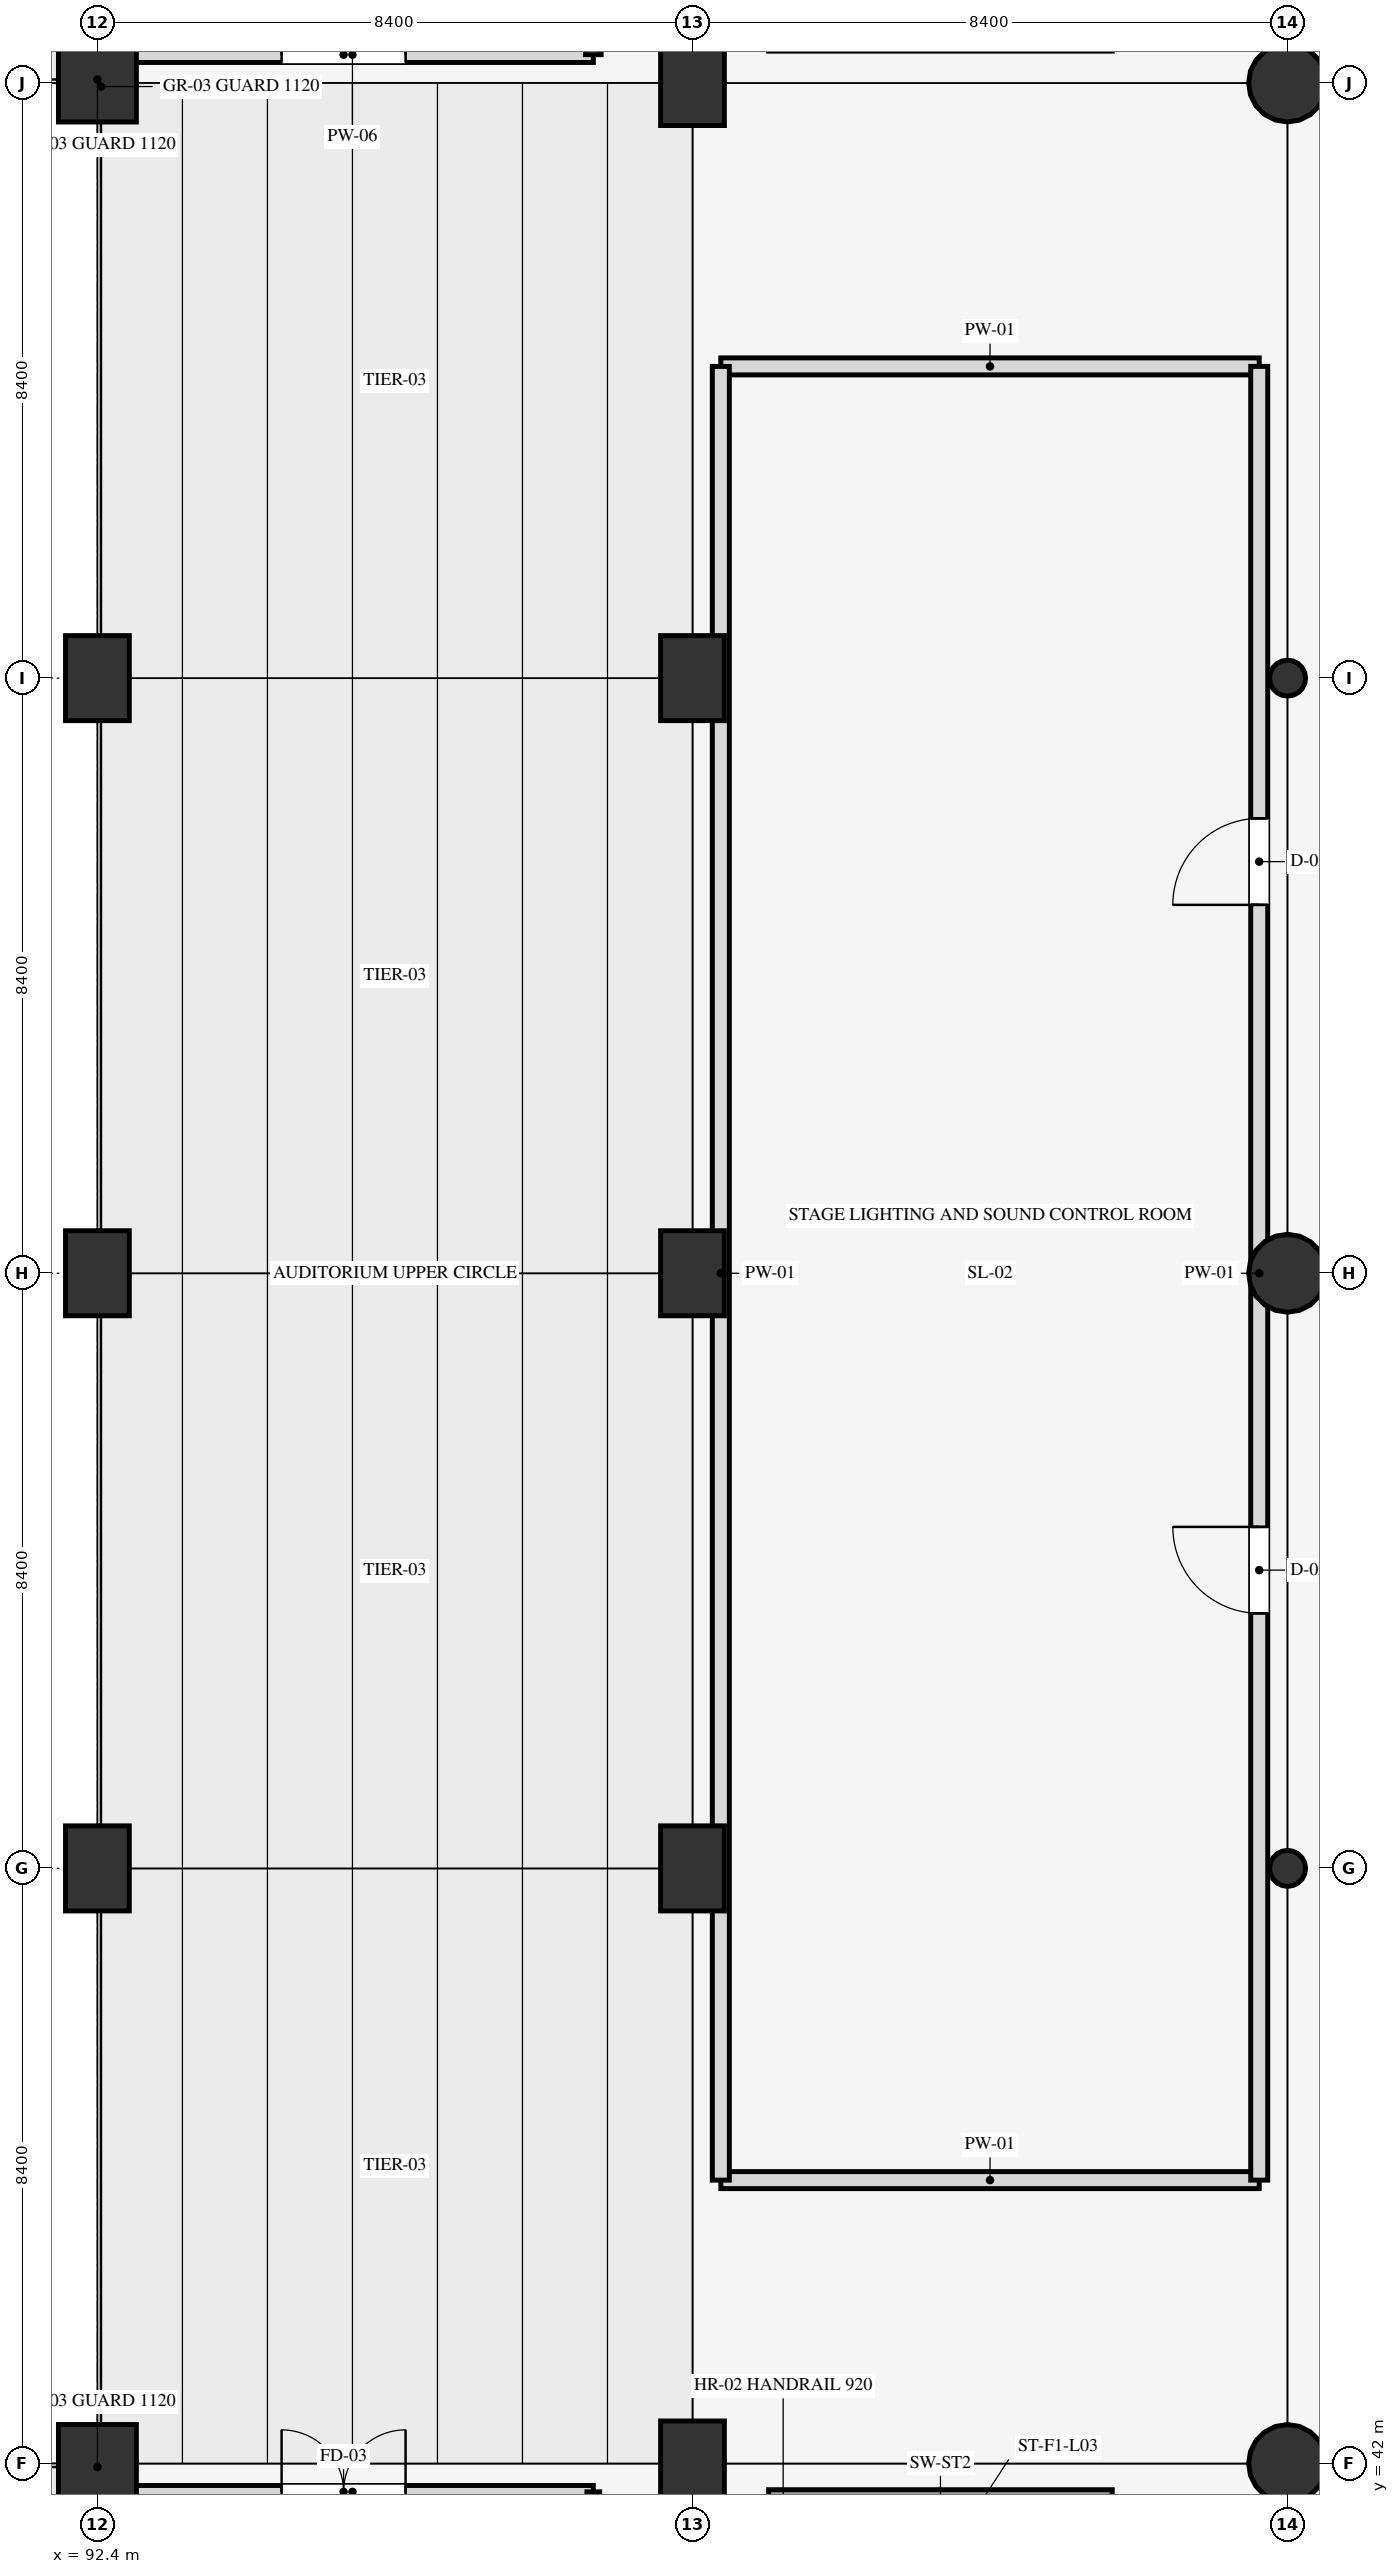
"""IFC4 building model, lengths in metres.
Left out: names, types, materials, properties, quantities, classifications, styles, units other than length and angle.
Written with IfcOpenShell. Run it as: python <this file> out.ifc"""

import sys

from ifc_helpers import new_model, si_unit, direction, frame, frame_2d, origin, origin_2d, place, context, subcontext, project, spatial, rectangle, circle, hollow_circle, extrude, element, fill, save


model = new_model("IFC4")
c1 = context("Model", 3, precision=1e-05, world=origin(), true_north=direction((0.0, 1.0)))
c2 = subcontext(c1, "Body", "Model", "MODEL_VIEW")
j1 = project(units=[si_unit("LENGTHUNIT", "METRE"), si_unit("PLANEANGLEUNIT", "RADIAN")], contexts=[c1])
p1 = place(None, origin())
s1 = spatial("IfcSite", under=j1, at=p1, CompositionType="ELEMENT")
p2 = place(p1, origin())
s2 = spatial("IfcBuilding", under=s1, at=p2, CompositionType="ELEMENT")
p3 = place(p2, frame((0.0, 0.0, 14.4)))
s3 = spatial("IfcBuildingStorey", under=s2, at=p3, CompositionType="ELEMENT", Elevation=14.4)
p4 = place(p3, frame((92.4, 42.0, 0.0), z_axis=(0.0, 0.0, 1.0), x_axis=(1.0, 0.0, 0.0)))
e1 = element("IfcColumn", 1, at=p4, inside=s3, PredefinedType="COLUMN", context=c2, shape_type="SweptSolid", body=[
    extrude(rectangle(XDim=1.1, YDim=1.1, at=origin_2d()), origin(), (0.0, 0.0, 1.0), 4.5),
])
for number, where, z_axis, x_axis in (
    (2, (92.4, 50.4, 0.0), (0.0, 0.0, 1.0), (1.0, 0.0, 0.0)),
    (3, (92.4, 58.8, 0.0), (0.0, 0.0, 1.0), (1.0, 0.0, 0.0)),
    (4, (92.4, 67.2, 0.0), (0.0, 0.0, 1.0), (1.0, 0.0, 0.0)),
):
    element("IfcColumn", number, at=place(p3, frame(where, z_axis=z_axis, x_axis=x_axis)), inside=s3, PredefinedType="COLUMN", context=c2, shape_type="SweptSolid", body=[
        extrude(rectangle(XDim=0.9, YDim=1.2, at=origin_2d()), origin(), (0.0, 0.0, 1.0), 4.5),
    ])
p5 = place(p3, frame((92.4, 75.6, 0.0), z_axis=(0.0, 0.0, 1.0), x_axis=(1.0, 0.0, 0.0)))
e5 = element("IfcColumn", 5, at=p5, inside=s3, PredefinedType="COLUMN", context=c2, shape_type="SweptSolid", body=[
    extrude(rectangle(XDim=1.1, YDim=1.1, at=origin_2d()), origin(), (0.0, 0.0, 1.0), 4.5),
])
for number, where, z_axis, x_axis in (
    (6, (100.8, 42.0, 0.0), (0.0, 0.0, 1.0), (1.0, 0.0, 0.0)),
    (7, (100.8, 50.4, 0.0), (0.0, 0.0, 1.0), (1.0, 0.0, 0.0)),
    (8, (100.8, 58.8, 0.0), (0.0, 0.0, 1.0), (1.0, 0.0, 0.0)),
    (9, (100.8, 67.2, 0.0), (0.0, 0.0, 1.0), (1.0, 0.0, 0.0)),
    (10, (100.8, 75.6, 0.0), (0.0, 0.0, 1.0), (1.0, 0.0, 0.0)),
):
    element("IfcColumn", number, at=place(p3, frame(where, z_axis=z_axis, x_axis=x_axis)), inside=s3, PredefinedType="COLUMN", context=c2, shape_type="SweptSolid", body=[
        extrude(rectangle(XDim=0.9, YDim=1.2, at=origin_2d()), origin(), (0.0, 0.0, 1.0), 4.5),
    ])
p6 = place(p3, frame((109.2, 42.0, 0.0), z_axis=(0.0, 0.0, 1.0), x_axis=(1.0, 0.0, 0.0)))
e11 = element("IfcColumn", 11, at=p6, inside=s3, PredefinedType="COLUMN", context=c2, shape_type="SweptSolid", body=[
    extrude(circle(Radius=0.55, at=origin_2d()), origin(), (0.0, 0.0, 1.0), 4.5),
])
p7 = place(p3, frame((109.2, 50.4, 0.0), z_axis=(0.0, 0.0, 1.0), x_axis=(1.0, 0.0, 0.0)))
e12 = element("IfcColumn", 12, at=p7, inside=s3, PredefinedType="COLUMN", context=c2, shape_type="SweptSolid", body=[
    extrude(hollow_circle(Radius=0.254, WallThickness=0.02, at=origin_2d()), origin(), (0.0, 0.0, 1.0), 4.5),
])
p8 = place(p3, frame((109.2, 58.8, 0.0), z_axis=(0.0, 0.0, 1.0), x_axis=(1.0, 0.0, 0.0)))
e13 = element("IfcColumn", 13, at=p8, inside=s3, PredefinedType="COLUMN", context=c2, shape_type="SweptSolid", body=[
    extrude(circle(Radius=0.55, at=origin_2d()), origin(), (0.0, 0.0, 1.0), 4.5),
])
p9 = place(p3, frame((109.2, 67.2, 0.0), z_axis=(0.0, 0.0, 1.0), x_axis=(1.0, 0.0, 0.0)))
e14 = element("IfcColumn", 14, at=p9, inside=s3, PredefinedType="COLUMN", context=c2, shape_type="SweptSolid", body=[
    extrude(hollow_circle(Radius=0.254, WallThickness=0.02, at=origin_2d()), origin(), (0.0, 0.0, 1.0), 4.5),
])
p10 = place(p3, frame((109.2, 75.6, 0.0), z_axis=(0.0, 0.0, 1.0), x_axis=(1.0, 0.0, 0.0)))
e15 = element("IfcColumn", 15, at=p10, inside=s3, PredefinedType="COLUMN", context=c2, shape_type="SweptSolid", body=[
    extrude(circle(Radius=0.55, at=origin_2d()), origin(), (0.0, 0.0, 1.0), 4.5),
])
p11 = place(p3, frame((101.875, 41.505, 0.0), z_axis=(0.0, 0.0, 1.0), x_axis=(1.0, 0.0, 0.0)))
e16 = element("IfcWall", 16, at=p11, inside=s3, PredefinedType="SHEAR", context=c2, shape_type="SweptSolid", body=[
    extrude(rectangle(XDim=4.85, YDim=0.25, at=frame_2d((2.425, 0.0))), origin(), (0.0, 0.0, 1.0), 4.5),
])
p12 = place(p3, frame((92.6, 41.6, 0.0), z_axis=(0.0, 0.0, 1.0), x_axis=(1.0, 0.0, 0.0)))
e17 = element("IfcWall", 17, at=p12, inside=s3, PredefinedType="PARTITIONING", context=c2, shape_type="SweptSolid", body=[
    extrude(rectangle(XDim=6.8, YDim=0.18, at=frame_2d((3.4, 0.0))), origin(), (0.0, 0.0, 1.0), 3.54),
])
p13 = place(p12, frame((2.4, 0.0, 0.0)))
e18 = element("IfcOpeningElement", 18, at=p13, cuts=e17, PredefinedType="OPENING", context=c2, shape_type="SweptSolid", body=[
    extrude(rectangle(XDim=1.75, YDim=2.2, at=frame_2d((0.875, 1.1))), frame((0.0, 0.1, 0.0), z_axis=(0.0, -1.0, 0.0), x_axis=(1.0, 0.0, 0.0)), (0.0, 0.0, 1.0), 0.2),
])
p14 = place(p3, frame((92.6, 34.2, 0.0), z_axis=(0.0, 0.0, 1.0), x_axis=(0.0, 1.0, 0.0)))
e19 = element("IfcWall", 19, at=p14, inside=s3, PredefinedType="PARTITIONING", context=c2, shape_type="SweptSolid", body=[
    extrude(rectangle(XDim=7.4, YDim=0.18, at=frame_2d((3.7, 0.0))), origin(), (0.0, 0.0, 1.0), 3.54),
])
p15 = place(p3, frame((99.4, 34.2, 0.0), z_axis=(0.0, 0.0, 1.0), x_axis=(0.0, 1.0, 0.0)))
e20 = element("IfcWall", 20, at=p15, inside=s3, PredefinedType="PARTITIONING", context=c2, shape_type="SweptSolid", body=[
    extrude(rectangle(XDim=7.4, YDim=0.18, at=frame_2d((3.7, 0.0))), origin(), (0.0, 0.0, 1.0), 3.54),
])
p16 = place(p15, frame((2.8, 0.0, 0.0)))
e21 = element("IfcOpeningElement", 21, at=p16, cuts=e20, PredefinedType="OPENING", context=c2, shape_type="SweptSolid", body=[
    extrude(rectangle(XDim=1.5, YDim=2.2, at=frame_2d((0.75, 1.1))), frame((0.0, 0.1, 0.0), z_axis=(0.0, -1.0, 0.0), x_axis=(1.0, 0.0, 0.0)), (0.0, 0.0, 1.0), 0.2),
])
p17 = place(p3, frame((92.6, 76.0, 0.0), z_axis=(0.0, 0.0, 1.0), x_axis=(1.0, 0.0, 0.0)))
e22 = element("IfcWall", 22, at=p17, inside=s3, PredefinedType="PARTITIONING", context=c2, shape_type="SweptSolid", body=[
    extrude(rectangle(XDim=6.8, YDim=0.22, at=frame_2d((3.4, 0.0))), origin(), (0.0, 0.0, 1.0), 3.54),
])
p18 = place(p17, frame((2.4, 0.0, 0.0)))
e23 = element("IfcOpeningElement", 23, at=p18, cuts=e22, PredefinedType="OPENING", context=c2, shape_type="SweptSolid", body=[
    extrude(rectangle(XDim=1.75, YDim=2.2, at=frame_2d((0.875, 1.1))), frame((0.0, 0.12, 0.0), z_axis=(0.0, -1.0, 0.0), x_axis=(1.0, 0.0, 0.0)), (0.0, 0.0, 1.0), 0.24),
])
p19 = place(p3, frame((92.6, 76.0, 0.0), z_axis=(0.0, 0.0, 1.0), x_axis=(0.0, 1.0, 0.0)))
e24 = element("IfcWall", 24, at=p19, inside=s3, PredefinedType="PARTITIONING", context=c2, shape_type="SweptSolid", body=[
    extrude(rectangle(XDim=7.4, YDim=0.22, at=frame_2d((3.7, 0.0))), origin(), (0.0, 0.0, 1.0), 3.54),
])
p20 = place(p3, frame((99.4, 76.0, 0.0), z_axis=(0.0, 0.0, 1.0), x_axis=(0.0, 1.0, 0.0)))
e25 = element("IfcWall", 25, at=p20, inside=s3, PredefinedType="PARTITIONING", context=c2, shape_type="SweptSolid", body=[
    extrude(rectangle(XDim=7.4, YDim=0.22, at=frame_2d((3.7, 0.0))), origin(), (0.0, 0.0, 1.0), 3.54),
])
p21 = place(p20, frame((2.8, 0.0, 0.0)))
e26 = element("IfcOpeningElement", 26, at=p21, cuts=e25, PredefinedType="OPENING", context=c2, shape_type="SweptSolid", body=[
    extrude(rectangle(XDim=1.62, YDim=2.22, at=frame_2d((0.81, 1.11))), frame((0.0, 0.12, 0.0), z_axis=(0.0, -1.0, 0.0), x_axis=(1.0, 0.0, 0.0)), (0.0, 0.0, 1.0), 0.24),
])
for number, where, z_axis, x_axis in (
    (27, (101.2, 46.0, 0.0), (0.0, 0.0, 1.0), (1.0, 0.0, 0.0)),
    (28, (101.2, 71.6, 0.0), (0.0, 0.0, 1.0), (1.0, 0.0, 0.0)),
):
    element("IfcWall", number, at=place(p3, frame(where, z_axis=z_axis, x_axis=x_axis)), inside=s3, PredefinedType="PARTITIONING", context=c2, shape_type="SweptSolid", body=[
        extrude(rectangle(XDim=7.6, YDim=0.24, at=frame_2d((3.8, 0.0))), origin(), (0.0, 0.0, 1.0), 3.54),
    ])
p22 = place(p3, frame((101.2, 46.0, 0.0), z_axis=(0.0, 0.0, 1.0), x_axis=(0.0, 1.0, 0.0)))
e29 = element("IfcWall", 29, at=p22, inside=s3, PredefinedType="PARTITIONING", context=c2, shape_type="SweptSolid", body=[
    extrude(rectangle(XDim=25.6, YDim=0.24, at=frame_2d((12.8, 0.0))), origin(), (0.0, 0.0, 1.0), 3.54),
])
p23 = place(p3, frame((108.8, 46.0, 0.0), z_axis=(0.0, 0.0, 1.0), x_axis=(0.0, 1.0, 0.0)))
e30 = element("IfcWall", 30, at=p23, inside=s3, PredefinedType="PARTITIONING", context=c2, shape_type="SweptSolid", body=[
    extrude(rectangle(XDim=25.6, YDim=0.24, at=frame_2d((12.8, 0.0))), origin(), (0.0, 0.0, 1.0), 3.54),
])
p24 = place(p23, frame((8.0, 0.0, 0.0)))
e31 = element("IfcOpeningElement", 31, at=p24, cuts=e30, PredefinedType="OPENING", context=c2, shape_type="SweptSolid", body=[
    extrude(rectangle(XDim=1.22, YDim=2.15, at=frame_2d((0.61, 1.075))), frame((0.0, 0.13, 0.0), z_axis=(0.0, -1.0, 0.0), x_axis=(1.0, 0.0, 0.0)), (0.0, 0.0, 1.0), 0.26),
])
p25 = place(p23, frame((18.0, 0.0, 0.0)))
e32 = element("IfcOpeningElement", 32, at=p25, cuts=e30, PredefinedType="OPENING", context=c2, shape_type="SweptSolid", body=[
    extrude(rectangle(XDim=1.22, YDim=2.15, at=frame_2d((0.61, 1.075))), frame((0.0, 0.13, 0.0), z_axis=(0.0, -1.0, 0.0), x_axis=(1.0, 0.0, 0.0)), (0.0, 0.0, 1.0), 0.26),
])
p26 = place(p13, origin())
e33 = element("IfcDoor", 33, at=p26, inside=s3, OperationType="DOUBLE_DOOR_SINGLE_SWING", PredefinedType="DOOR", context=c2, shape_type="SweptSolid", body=[
    extrude(rectangle(XDim=1.75, YDim=2.2, at=frame_2d((0.875, 1.1))), frame((0.0, 0.025, 0.0), z_axis=(0.0, -1.0, 0.0), x_axis=(1.0, 0.0, 0.0)), (0.0, 0.0, 1.0), 0.05),
])
fill(e18, e33)
p27 = place(p18, origin())
e34 = element("IfcDoor", 34, at=p27, inside=s3, OperationType="DOUBLE_DOOR_SINGLE_SWING", PredefinedType="DOOR", context=c2, shape_type="SweptSolid", body=[
    extrude(rectangle(XDim=1.75, YDim=2.2, at=frame_2d((0.875, 1.1))), frame((0.0, 0.025, 0.0), z_axis=(0.0, -1.0, 0.0), x_axis=(1.0, 0.0, 0.0)), (0.0, 0.0, 1.0), 0.05),
])
fill(e23, e34)
p28 = place(p24, origin())
e35 = element("IfcDoor", 35, at=p28, inside=s3, OperationType="SINGLE_SWING_RIGHT", PredefinedType="DOOR", context=c2, shape_type="SweptSolid", body=[
    extrude(rectangle(XDim=1.22, YDim=2.15, at=frame_2d((0.61, 1.075))), frame((0.0, 0.025, 0.0), z_axis=(0.0, -1.0, 0.0), x_axis=(1.0, 0.0, 0.0)), (0.0, 0.0, 1.0), 0.05),
])
fill(e31, e35)
p29 = place(p25, origin())
e36 = element("IfcDoor", 36, at=p29, inside=s3, OperationType="SINGLE_SWING_LEFT", PredefinedType="DOOR", context=c2, shape_type="SweptSolid", body=[
    extrude(rectangle(XDim=1.22, YDim=2.15, at=frame_2d((0.61, 1.075))), frame((0.0, 0.025, 0.0), z_axis=(0.0, -1.0, 0.0), x_axis=(1.0, 0.0, 0.0)), (0.0, 0.0, 1.0), 0.05),
])
fill(e32, e36)
save(model, sys.argv[1])
